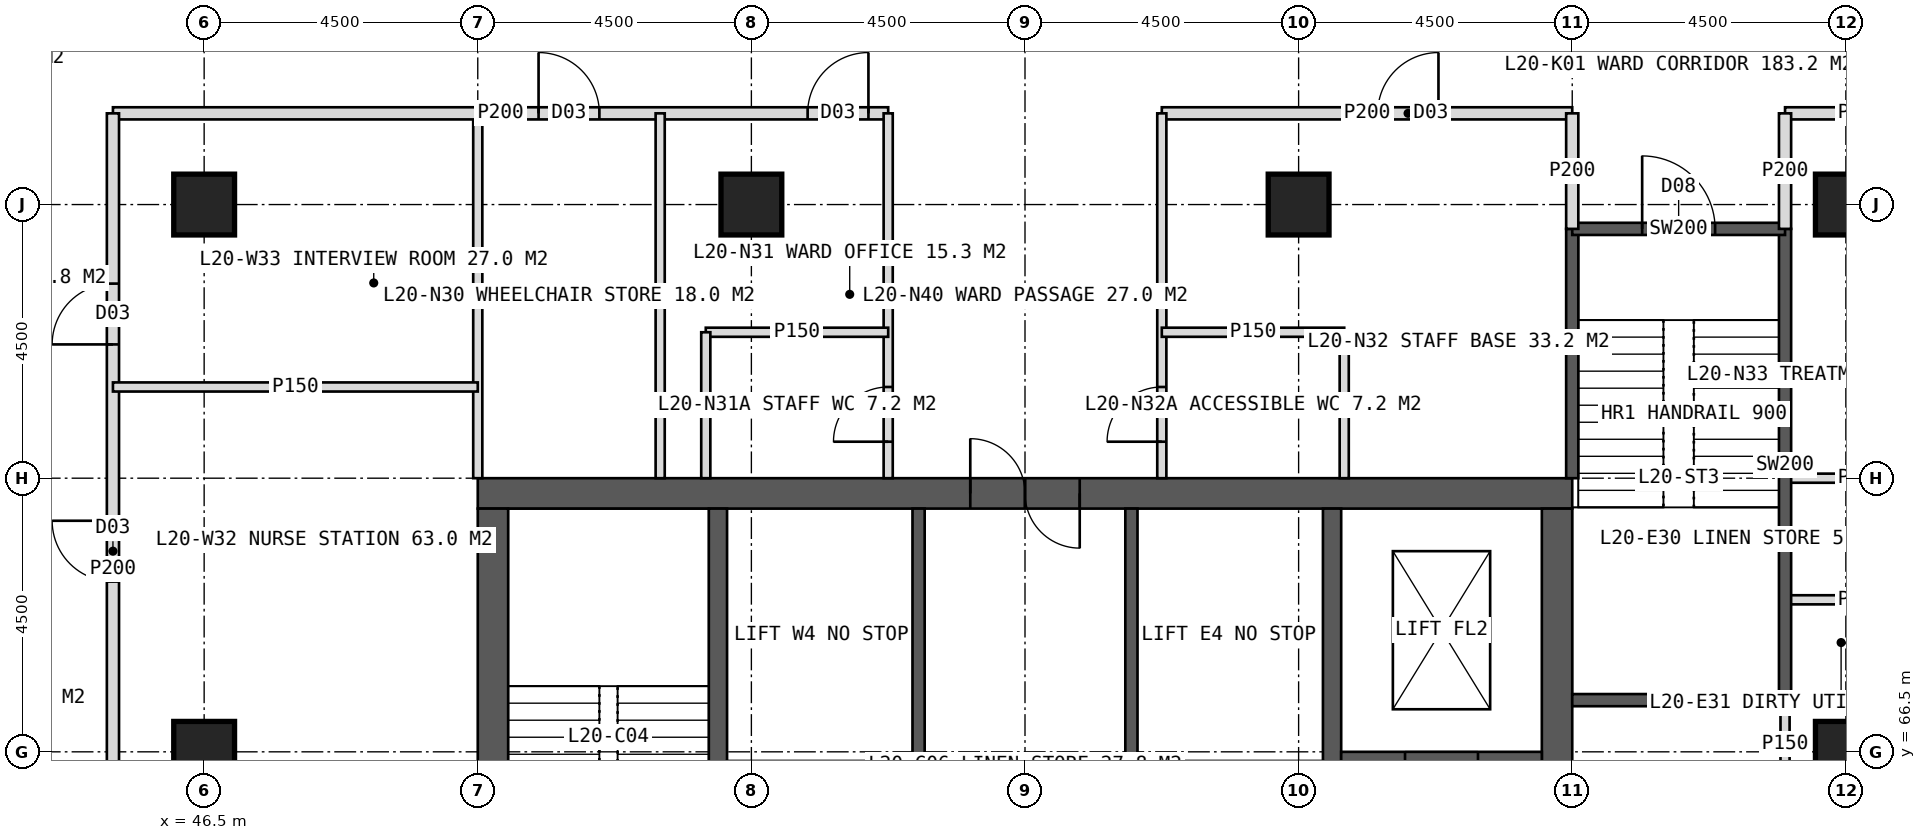
"""IFC4 building model, lengths in metres.
Left out: names, types, materials, properties, quantities, classifications, styles, units other than length and angle.
Written with IfcOpenShell. Run it as: python <this file> out.ifc"""

import sys

from ifc_helpers import new_model, si_unit, direction, frame, frame_2d, origin, origin_2d, place, context, subcontext, project, spatial, rectangle, hollow_rectangle, extrude, element, fill, save


model = new_model("IFC4")
c1 = context("Model", 3, precision=1e-05, world=origin(), true_north=direction((0.0, 1.0)))
c2 = subcontext(c1, "Body", "Model", "MODEL_VIEW")
j1 = project(units=[si_unit("LENGTHUNIT", "METRE"), si_unit("PLANEANGLEUNIT", "RADIAN")], contexts=[c1])
p1 = place(None, origin())
s1 = spatial("IfcSite", under=j1, at=p1, CompositionType="ELEMENT")
p2 = place(p1, origin())
s2 = spatial("IfcBuilding", under=s1, at=p2, CompositionType="ELEMENT")
p3 = place(p2, frame((0.0, 0.0, 87.0)))
s3 = spatial("IfcBuildingStorey", under=s2, at=p3, CompositionType="ELEMENT", Elevation=87.0)
p4 = place(p3, frame((51.0, 70.75, 0.0), z_axis=(0.0, 0.0, 1.0), x_axis=(1.0, 0.0, 0.0)))
e1 = element("IfcWall", 1, at=p4, inside=s3, PredefinedType="SHEAR", context=c2, shape_type="SweptSolid", body=[
    extrude(rectangle(XDim=18.0, YDim=0.5, at=frame_2d((9.0, 0.0))), origin(), (0.0, 0.0, 1.0), 4.0),
])
p5 = place(p4, frame((8.1, 0.0, 0.0)))
e2 = element("IfcOpeningElement", 2, at=p5, cuts=e1, PredefinedType="OPENING", context=c2, shape_type="SweptSolid", body=[
    extrude(rectangle(XDim=1.8, YDim=2.2, at=frame_2d((0.9, 1.1))), frame((0.0, 0.26, 0.0), z_axis=(0.0, -1.0, 0.0), x_axis=(1.0, 0.0, 0.0)), (0.0, 0.0, 1.0), 0.52),
])
p6 = place(p3, frame((51.25, 53.5, 0.0), z_axis=(0.0, 0.0, 1.0), x_axis=(0.0, 1.0, 0.0)))
e3 = element("IfcWall", 3, at=p6, inside=s3, PredefinedType="SHEAR", context=c2, shape_type="SweptSolid", body=[
    extrude(rectangle(XDim=17.0, YDim=0.5, at=frame_2d((8.5, 0.0))), origin(), (0.0, 0.0, 1.0), 4.0),
])
p7 = place(p6, frame((6.0, 0.0, 0.0)))
e4 = element("IfcOpeningElement", 4, at=p7, cuts=e3, PredefinedType="OPENING", context=c2, shape_type="SweptSolid", body=[
    extrude(rectangle(XDim=1.5, YDim=2.2, at=frame_2d((0.75, 1.1))), frame((0.0, 0.26, 0.0), z_axis=(0.0, -1.0, 0.0), x_axis=(1.0, 0.0, 0.0)), (0.0, 0.0, 1.0), 0.52),
])
p8 = place(p3, frame((68.75, 53.5, 0.0), z_axis=(0.0, 0.0, 1.0), x_axis=(0.0, 1.0, 0.0)))
e5 = element("IfcWall", 5, at=p8, inside=s3, PredefinedType="SHEAR", context=c2, shape_type="SweptSolid", body=[
    extrude(rectangle(XDim=17.0, YDim=0.5, at=frame_2d((8.5, 0.0))), origin(), (0.0, 0.0, 1.0), 4.0),
])
p9 = place(p8, frame((9.5, 0.0, 0.0)))
e6 = element("IfcOpeningElement", 6, at=p9, cuts=e5, PredefinedType="OPENING", context=c2, shape_type="SweptSolid", body=[
    extrude(rectangle(XDim=1.5, YDim=2.2, at=frame_2d((0.75, 1.1))), frame((0.0, 0.26, 0.0), z_axis=(0.0, -1.0, 0.0), x_axis=(1.0, 0.0, 0.0)), (0.0, 0.0, 1.0), 0.52),
])
for number, where, z_axis, x_axis in (
    (7, (54.95, 53.5, 0.0), (0.0, 0.0, 1.0), (0.0, 1.0, 0.0)),
    (8, (65.05, 53.5, 0.0), (0.0, 0.0, 1.0), (0.0, 1.0, 0.0)),
):
    element("IfcWall", number, at=place(p3, frame(where, z_axis=z_axis, x_axis=x_axis)), inside=s3, PredefinedType="SHEAR", context=c2, shape_type="SweptSolid", body=[
        extrude(rectangle(XDim=17.0, YDim=0.3, at=frame_2d((8.5, 0.0))), origin(), (0.0, 0.0, 1.0), 4.0),
    ])
p10 = place(p3, frame((58.25, 53.5, 0.0), z_axis=(0.0, 0.0, 1.0), x_axis=(0.0, 1.0, 0.0)))
e9 = element("IfcWall", 9, at=p10, inside=s3, PredefinedType="SHEAR", context=c2, shape_type="SweptSolid", body=[
    extrude(rectangle(XDim=17.0, YDim=0.2, at=frame_2d((8.5, 0.0))), origin(), (0.0, 0.0, 1.0), 4.0),
])
p11 = place(p10, frame((1.375, 0.0, 0.0)))
e10 = element("IfcOpeningElement", 10, at=p11, cuts=e9, PredefinedType="OPENING", context=c2, shape_type="SweptSolid", body=[
    extrude(rectangle(XDim=1.4, YDim=2.2, at=frame_2d((0.7, 1.1))), frame((0.0, 0.11, 0.0), z_axis=(0.0, -1.0, 0.0), x_axis=(1.0, 0.0, 0.0)), (0.0, 0.0, 1.0), 0.22),
])
p12 = place(p10, frame((5.675, 0.0, 0.0)))
e11 = element("IfcOpeningElement", 11, at=p12, cuts=e9, PredefinedType="OPENING", context=c2, shape_type="SweptSolid", body=[
    extrude(rectangle(XDim=1.4, YDim=2.2, at=frame_2d((0.7, 1.1))), frame((0.0, 0.11, 0.0), z_axis=(0.0, -1.0, 0.0), x_axis=(1.0, 0.0, 0.0)), (0.0, 0.0, 1.0), 0.22),
])
p13 = place(p3, frame((61.75, 53.5, 0.0), z_axis=(0.0, 0.0, 1.0), x_axis=(0.0, 1.0, 0.0)))
e12 = element("IfcWall", 12, at=p13, inside=s3, PredefinedType="SHEAR", context=c2, shape_type="SweptSolid", body=[
    extrude(rectangle(XDim=17.0, YDim=0.2, at=frame_2d((8.5, 0.0))), origin(), (0.0, 0.0, 1.0), 4.0),
])
p14 = place(p13, frame((1.375, 0.0, 0.0)))
e13 = element("IfcOpeningElement", 13, at=p14, cuts=e12, PredefinedType="OPENING", context=c2, shape_type="SweptSolid", body=[
    extrude(rectangle(XDim=1.4, YDim=2.2, at=frame_2d((0.7, 1.1))), frame((0.0, 0.11, 0.0), z_axis=(0.0, -1.0, 0.0), x_axis=(1.0, 0.0, 0.0)), (0.0, 0.0, 1.0), 0.22),
])
p15 = place(p13, frame((5.675, 0.0, 0.0)))
e14 = element("IfcOpeningElement", 14, at=p15, cuts=e12, PredefinedType="OPENING", context=c2, shape_type="SweptSolid", body=[
    extrude(rectangle(XDim=1.4, YDim=2.2, at=frame_2d((0.7, 1.1))), frame((0.0, 0.11, 0.0), z_axis=(0.0, -1.0, 0.0), x_axis=(1.0, 0.0, 0.0)), (0.0, 0.0, 1.0), 0.22),
])
p16 = place(p3, frame((65.2, 66.35, 0.0), z_axis=(0.0, 0.0, 1.0), x_axis=(1.0, 0.0, 0.0)))
e15 = element("IfcWall", 15, at=p16, inside=s3, PredefinedType="SHEAR", context=c2, shape_type="SweptSolid", body=[
    extrude(rectangle(XDim=3.3, YDim=0.3, at=frame_2d((1.65, 0.0))), origin(), (0.0, 0.0, 1.0), 4.0),
])
p17 = place(p16, frame((1.05, 0.0, 0.0)))
e16 = element("IfcOpeningElement", 16, at=p17, cuts=e15, PredefinedType="OPENING", context=c2, shape_type="SweptSolid", body=[
    extrude(rectangle(XDim=1.2, YDim=2.2, at=frame_2d((0.6, 1.1))), frame((0.0, 0.16, 0.0), z_axis=(0.0, -1.0, 0.0), x_axis=(1.0, 0.0, 0.0)), (0.0, 0.0, 1.0), 0.32),
])
for number, where, z_axis, x_axis in (
    (17, (73.5, 75.5, 0.0), (0.0, 0.0, 1.0), (1.0, 0.0, 0.0)),
    (18, (46.5, 75.5, 0.0), (0.0, 0.0, 1.0), (1.0, 0.0, 0.0)),
    (19, (55.5, 75.5, 0.0), (0.0, 0.0, 1.0), (1.0, 0.0, 0.0)),
    (20, (64.5, 75.5, 0.0), (0.0, 0.0, 1.0), (1.0, 0.0, 0.0)),
    (21, (46.5, 66.5, 0.0), (0.0, 0.0, 1.0), (1.0, 0.0, 0.0)),
    (22, (73.5, 66.5, 0.0), (0.0, 0.0, 1.0), (1.0, 0.0, 0.0)),
):
    element("IfcColumn", number, at=place(p3, frame(where, z_axis=z_axis, x_axis=x_axis)), inside=s3, PredefinedType="COLUMN", context=c2, shape_type="SweptSolid", body=[
        extrude(hollow_rectangle(XDim=1.0, YDim=1.0, WallThickness=0.1, at=origin_2d()), origin(), (0.0, 0.0, 1.0), 4.0),
    ])
p18 = place(p3, frame((51.0, 71.0, 0.0), z_axis=(0.0, 0.0, 1.0), x_axis=(0.0, 1.0, 0.0)))
e23 = element("IfcWall", 23, at=p18, inside=s3, PredefinedType="PARTITIONING", context=c2, shape_type="SweptSolid", body=[
    extrude(rectangle(XDim=6.0, YDim=0.15, at=frame_2d((3.0, 0.0))), origin(), (0.0, 0.0, 1.0), 3.75),
])
p19 = place(p3, frame((45.0, 77.0, 0.0), z_axis=(0.0, 0.0, 1.0), x_axis=(1.0, 0.0, 0.0)))
e24 = element("IfcWall", 24, at=p19, inside=s3, PredefinedType="PARTITIONING", context=c2, shape_type="SweptSolid", body=[
    extrude(rectangle(XDim=12.75, YDim=0.2, at=frame_2d((6.375, 0.0))), origin(), (0.0, 0.0, 1.0), 3.75),
])
p20 = place(p19, frame((7.0, 0.0, 0.0)))
e25 = element("IfcOpeningElement", 25, at=p20, cuts=e24, PredefinedType="OPENING", context=c2, shape_type="SweptSolid", body=[
    extrude(rectangle(XDim=1.0, YDim=2.1, at=frame_2d((0.5, 1.05))), frame((0.0, 0.11, 0.0), z_axis=(0.0, -1.0, 0.0), x_axis=(1.0, 0.0, 0.0)), (0.0, 0.0, 1.0), 0.22),
])
p21 = place(p19, frame((11.425, 0.0, 0.0)))
e26 = element("IfcOpeningElement", 26, at=p21, cuts=e24, PredefinedType="OPENING", context=c2, shape_type="SweptSolid", body=[
    extrude(rectangle(XDim=1.0, YDim=2.1, at=frame_2d((0.5, 1.05))), frame((0.0, 0.11, 0.0), z_axis=(0.0, -1.0, 0.0), x_axis=(1.0, 0.0, 0.0)), (0.0, 0.0, 1.0), 0.22),
])
p22 = place(p3, frame((62.25, 77.0, 0.0), z_axis=(0.0, 0.0, 1.0), x_axis=(1.0, 0.0, 0.0)))
e27 = element("IfcWall", 27, at=p22, inside=s3, PredefinedType="PARTITIONING", context=c2, shape_type="SweptSolid", body=[
    extrude(rectangle(XDim=6.75, YDim=0.2, at=frame_2d((3.375, 0.0))), origin(), (0.0, 0.0, 1.0), 3.75),
])
p23 = place(p22, frame((3.55, 0.0, 0.0)))
e28 = element("IfcOpeningElement", 28, at=p23, cuts=e27, PredefinedType="OPENING", context=c2, shape_type="SweptSolid", body=[
    extrude(rectangle(XDim=1.0, YDim=2.1, at=frame_2d((0.5, 1.05))), frame((0.0, 0.11, 0.0), z_axis=(0.0, -1.0, 0.0), x_axis=(1.0, 0.0, 0.0)), (0.0, 0.0, 1.0), 0.22),
])
p24 = place(p3, frame((72.5, 77.0, 0.0), z_axis=(0.0, 0.0, 1.0), x_axis=(1.0, 0.0, 0.0)))
e29 = element("IfcWall", 29, at=p24, inside=s3, PredefinedType="PARTITIONING", context=c2, shape_type="SweptSolid", body=[
    extrude(rectangle(XDim=2.5, YDim=0.2, at=frame_2d((1.25, 0.0))), origin(), (0.0, 0.0, 1.0), 3.75),
])
p25 = place(p3, frame((57.75, 71.0, 0.0), z_axis=(0.0, 0.0, 1.0), x_axis=(0.0, 1.0, 0.0)))
e30 = element("IfcWall", 30, at=p25, inside=s3, PredefinedType="PARTITIONING", context=c2, shape_type="SweptSolid", body=[
    extrude(rectangle(XDim=6.0, YDim=0.15, at=frame_2d((3.0, 0.0))), origin(), (0.0, 0.0, 1.0), 3.75),
])
p26 = place(p25, frame((0.6, 0.0, 0.0)))
e31 = element("IfcOpeningElement", 31, at=p26, cuts=e30, PredefinedType="OPENING", context=c2, shape_type="SweptSolid", body=[
    extrude(rectangle(XDim=0.9, YDim=2.1, at=frame_2d((0.45, 1.05))), frame((0.0, 0.085, 0.0), z_axis=(0.0, -1.0, 0.0), x_axis=(1.0, 0.0, 0.0)), (0.0, 0.0, 1.0), 0.17),
])
p27 = place(p3, frame((62.25, 71.0, 0.0), z_axis=(0.0, 0.0, 1.0), x_axis=(0.0, 1.0, 0.0)))
e32 = element("IfcWall", 32, at=p27, inside=s3, PredefinedType="PARTITIONING", context=c2, shape_type="SweptSolid", body=[
    extrude(rectangle(XDim=6.0, YDim=0.15, at=frame_2d((3.0, 0.0))), origin(), (0.0, 0.0, 1.0), 3.75),
])
p28 = place(p27, frame((0.6, 0.0, 0.0)))
e33 = element("IfcOpeningElement", 33, at=p28, cuts=e32, PredefinedType="OPENING", context=c2, shape_type="SweptSolid", body=[
    extrude(rectangle(XDim=0.9, YDim=2.1, at=frame_2d((0.45, 1.05))), frame((0.0, 0.085, 0.0), z_axis=(0.0, -1.0, 0.0), x_axis=(1.0, 0.0, 0.0)), (0.0, 0.0, 1.0), 0.17),
])
p29 = place(p3, frame((54.0, 71.0, 0.0), z_axis=(0.0, 0.0, 1.0), x_axis=(0.0, 1.0, 0.0)))
e34 = element("IfcWall", 34, at=p29, inside=s3, PredefinedType="PARTITIONING", context=c2, shape_type="SweptSolid", body=[
    extrude(rectangle(XDim=6.0, YDim=0.15, at=frame_2d((3.0, 0.0))), origin(), (0.0, 0.0, 1.0), 3.75),
])
p30 = place(p3, frame((54.75, 73.4, 0.0), z_axis=(0.0, 0.0, 1.0), x_axis=(1.0, 0.0, 0.0)))
e35 = element("IfcWall", 35, at=p30, inside=s3, PredefinedType="PARTITIONING", context=c2, shape_type="SweptSolid", body=[
    extrude(rectangle(XDim=3.0, YDim=0.15, at=frame_2d((1.5, 0.0))), origin(), (0.0, 0.0, 1.0), 3.75),
])
p31 = place(p3, frame((54.75, 71.0, 0.0), z_axis=(0.0, 0.0, 1.0), x_axis=(0.0, 1.0, 0.0)))
e36 = element("IfcWall", 36, at=p31, inside=s3, PredefinedType="PARTITIONING", context=c2, shape_type="SweptSolid", body=[
    extrude(rectangle(XDim=2.4, YDim=0.15, at=frame_2d((1.2, 0.0))), origin(), (0.0, 0.0, 1.0), 3.75),
])
p32 = place(p3, frame((62.25, 73.4, 0.0), z_axis=(0.0, 0.0, 1.0), x_axis=(1.0, 0.0, 0.0)))
e37 = element("IfcWall", 37, at=p32, inside=s3, PredefinedType="PARTITIONING", context=c2, shape_type="SweptSolid", body=[
    extrude(rectangle(XDim=3.0, YDim=0.15, at=frame_2d((1.5, 0.0))), origin(), (0.0, 0.0, 1.0), 3.75),
])
p33 = place(p3, frame((65.25, 71.0, 0.0), z_axis=(0.0, 0.0, 1.0), x_axis=(0.0, 1.0, 0.0)))
e38 = element("IfcWall", 38, at=p33, inside=s3, PredefinedType="PARTITIONING", context=c2, shape_type="SweptSolid", body=[
    extrude(rectangle(XDim=2.4, YDim=0.15, at=frame_2d((1.2, 0.0))), origin(), (0.0, 0.0, 1.0), 3.75),
])
p34 = place(p3, frame((45.0, 62.0, 0.0), z_axis=(0.0, 0.0, 1.0), x_axis=(0.0, 1.0, 0.0)))
e39 = element("IfcWall", 39, at=p34, inside=s3, PredefinedType="PARTITIONING", context=c2, shape_type="SweptSolid", body=[
    extrude(rectangle(XDim=15.0, YDim=0.2, at=frame_2d((7.5, 0.0))), origin(), (0.0, 0.0, 1.0), 3.75),
])
p35 = place(p34, frame((7.3, 0.0, 0.0)))
e40 = element("IfcOpeningElement", 40, at=p35, cuts=e39, PredefinedType="OPENING", context=c2, shape_type="SweptSolid", body=[
    extrude(rectangle(XDim=1.0, YDim=2.1, at=frame_2d((0.5, 1.05))), frame((0.0, 0.11, 0.0), z_axis=(0.0, -1.0, 0.0), x_axis=(1.0, 0.0, 0.0)), (0.0, 0.0, 1.0), 0.22),
])
p36 = place(p34, frame((11.2, 0.0, 0.0)))
e41 = element("IfcOpeningElement", 41, at=p36, cuts=e39, PredefinedType="OPENING", context=c2, shape_type="SweptSolid", body=[
    extrude(rectangle(XDim=1.0, YDim=2.1, at=frame_2d((0.5, 1.05))), frame((0.0, 0.11, 0.0), z_axis=(0.0, -1.0, 0.0), x_axis=(1.0, 0.0, 0.0)), (0.0, 0.0, 1.0), 0.22),
])
p37 = place(p3, frame((51.0, 72.5, 0.0), z_axis=(0.0, 0.0, 1.0), x_axis=(-1.0, 0.0, 0.0)))
e42 = element("IfcWall", 42, at=p37, inside=s3, PredefinedType="PARTITIONING", context=c2, shape_type="SweptSolid", body=[
    extrude(rectangle(XDim=6.0, YDim=0.15, at=frame_2d((3.0, 0.0))), origin(), (0.0, 0.0, 1.0), 3.75),
])
for number, where, z_axis, x_axis in (
    (43, (72.5, 71.0, 0.0), (0.0, 0.0, 1.0), (1.0, 0.0, 0.0)),
    (44, (72.5, 69.0, 0.0), (0.0, 0.0, 1.0), (1.0, 0.0, 0.0)),
):
    element("IfcWall", number, at=place(p3, frame(where, z_axis=z_axis, x_axis=x_axis)), inside=s3, PredefinedType="PARTITIONING", context=c2, shape_type="SweptSolid", body=[
        extrude(rectangle(XDim=2.5, YDim=0.15, at=frame_2d((1.25, 0.0))), origin(), (0.0, 0.0, 1.0), 3.75),
    ])
p38 = place(p3, frame((72.5, 65.9, 0.0), z_axis=(0.0, 0.0, 1.0), x_axis=(0.0, 1.0, 0.0)))
e45 = element("IfcWall", 45, at=p38, inside=s3, PredefinedType="PARTITIONING", context=c2, shape_type="SweptSolid", body=[
    extrude(rectangle(XDim=1.45, YDim=0.15, at=frame_2d((0.725, 0.0))), origin(), (0.0, 0.0, 1.0), 3.75),
])
p39 = place(p3, frame((69.0, 71.0, 0.0), z_axis=(0.0, 0.0, 1.0), x_axis=(0.0, 1.0, 0.0)))
e46 = element("IfcWall", 46, at=p39, inside=s3, PredefinedType="SOLIDWALL", context=c2, shape_type="SweptSolid", body=[
    extrude(rectangle(XDim=4.1, YDim=0.2, at=frame_2d((2.05, 0.0))), origin(), (0.0, 0.0, 1.0), 3.75),
])
p40 = place(p3, frame((69.0, 67.35, 0.0), z_axis=(0.0, 0.0, 1.0), x_axis=(1.0, 0.0, 0.0)))
e47 = element("IfcWall", 47, at=p40, inside=s3, PredefinedType="SOLIDWALL", context=c2, shape_type="SweptSolid", body=[
    extrude(rectangle(XDim=3.5, YDim=0.2, at=frame_2d((1.75, 0.0))), origin(), (0.0, 0.0, 1.0), 3.75),
])
p41 = place(p3, frame((72.5, 67.35, 0.0), z_axis=(0.0, 0.0, 1.0), x_axis=(0.0, 1.0, 0.0)))
e48 = element("IfcWall", 48, at=p41, inside=s3, PredefinedType="SOLIDWALL", context=c2, shape_type="SweptSolid", body=[
    extrude(rectangle(XDim=7.75, YDim=0.2, at=frame_2d((3.875, 0.0))), origin(), (0.0, 0.0, 1.0), 3.75),
])
p42 = place(p3, frame((69.0, 75.1, 0.0), z_axis=(0.0, 0.0, 1.0), x_axis=(1.0, 0.0, 0.0)))
e49 = element("IfcWall", 49, at=p42, inside=s3, PredefinedType="SOLIDWALL", context=c2, shape_type="SweptSolid", body=[
    extrude(rectangle(XDim=3.5, YDim=0.2, at=frame_2d((1.75, 0.0))), origin(), (0.0, 0.0, 1.0), 3.75),
])
p43 = place(p42, frame((1.15, 0.0, 0.0)))
e50 = element("IfcOpeningElement", 50, at=p43, cuts=e49, PredefinedType="OPENING", context=c2, shape_type="SweptSolid", body=[
    extrude(rectangle(XDim=1.2, YDim=2.1, at=frame_2d((0.6, 1.05))), frame((0.0, 0.11, 0.0), z_axis=(0.0, -1.0, 0.0), x_axis=(1.0, 0.0, 0.0)), (0.0, 0.0, 1.0), 0.22),
])
for number, where, z_axis, x_axis in (
    (51, (69.0, 75.1, 0.0), (0.0, 0.0, 1.0), (0.0, 1.0, 0.0)),
    (52, (72.5, 75.1, 0.0), (0.0, 0.0, 1.0), (0.0, 1.0, 0.0)),
):
    element("IfcWall", number, at=place(p3, frame(where, z_axis=z_axis, x_axis=x_axis)), inside=s3, PredefinedType="PARTITIONING", context=c2, shape_type="SweptSolid", body=[
        extrude(rectangle(XDim=1.9, YDim=0.2, at=frame_2d((0.95, 0.0))), origin(), (0.0, 0.0, 1.0), 3.75),
    ])
p44 = place(p20, origin())
e53 = element("IfcDoor", 53, at=p44, inside=s3, OperationType="SINGLE_SWING_LEFT", PredefinedType="DOOR", context=c2, shape_type="SweptSolid", body=[
    extrude(rectangle(XDim=1.0, YDim=2.1, at=frame_2d((0.5, 1.05))), frame((0.0, 0.025, 0.0), z_axis=(0.0, -1.0, 0.0), x_axis=(1.0, 0.0, 0.0)), (0.0, 0.0, 1.0), 0.05),
])
fill(e25, e53)
p45 = place(p26, origin())
e54 = element("IfcDoor", 54, at=p45, inside=s3, OperationType="SINGLE_SWING_LEFT", PredefinedType="DOOR", context=c2, shape_type="SweptSolid", body=[
    extrude(rectangle(XDim=0.9, YDim=2.1, at=frame_2d((0.45, 1.05))), frame((0.0, 0.025, 0.0), z_axis=(0.0, -1.0, 0.0), x_axis=(1.0, 0.0, 0.0)), (0.0, 0.0, 1.0), 0.05),
])
fill(e31, e54)
p46 = place(p21, origin())
e55 = element("IfcDoor", 55, at=p46, inside=s3, OperationType="SINGLE_SWING_RIGHT", PredefinedType="DOOR", context=c2, shape_type="SweptSolid", body=[
    extrude(rectangle(XDim=1.0, YDim=2.1, at=frame_2d((0.5, 1.05))), frame((0.0, 0.025, 0.0), z_axis=(0.0, -1.0, 0.0), x_axis=(1.0, 0.0, 0.0)), (0.0, 0.0, 1.0), 0.05),
])
fill(e26, e55)
p47 = place(p28, origin())
e56 = element("IfcDoor", 56, at=p47, inside=s3, OperationType="SINGLE_SWING_LEFT", PredefinedType="DOOR", context=c2, shape_type="SweptSolid", body=[
    extrude(rectangle(XDim=0.9, YDim=2.1, at=frame_2d((0.45, 1.05))), frame((0.0, 0.025, 0.0), z_axis=(0.0, -1.0, 0.0), x_axis=(1.0, 0.0, 0.0)), (0.0, 0.0, 1.0), 0.05),
])
fill(e33, e56)
p48 = place(p23, origin())
e57 = element("IfcDoor", 57, at=p48, inside=s3, OperationType="SINGLE_SWING_RIGHT", PredefinedType="DOOR", context=c2, shape_type="SweptSolid", body=[
    extrude(rectangle(XDim=1.0, YDim=2.1, at=frame_2d((0.5, 1.05))), frame((0.0, 0.025, 0.0), z_axis=(0.0, -1.0, 0.0), x_axis=(1.0, 0.0, 0.0)), (0.0, 0.0, 1.0), 0.05),
])
fill(e28, e57)
p49 = place(p35, origin())
e58 = element("IfcDoor", 58, at=p49, inside=s3, OperationType="SINGLE_SWING_RIGHT", PredefinedType="DOOR", context=c2, shape_type="SweptSolid", body=[
    extrude(rectangle(XDim=1.0, YDim=2.1, at=frame_2d((0.5, 1.05))), frame((0.0, 0.025, 0.0), z_axis=(0.0, -1.0, 0.0), x_axis=(1.0, 0.0, 0.0)), (0.0, 0.0, 1.0), 0.05),
])
fill(e40, e58)
p50 = place(p36, origin())
e59 = element("IfcDoor", 59, at=p50, inside=s3, OperationType="SINGLE_SWING_LEFT", PredefinedType="DOOR", context=c2, shape_type="SweptSolid", body=[
    extrude(rectangle(XDim=1.0, YDim=2.1, at=frame_2d((0.5, 1.05))), frame((0.0, 0.025, 0.0), z_axis=(0.0, -1.0, 0.0), x_axis=(1.0, 0.0, 0.0)), (0.0, 0.0, 1.0), 0.05),
])
fill(e41, e59)
p51 = place(p17, origin())
e60 = element("IfcDoor", 60, at=p51, inside=s3, OperationType="SLIDING_TO_LEFT", PredefinedType="DOOR", context=c2, shape_type="SweptSolid", body=[
    extrude(rectangle(XDim=1.2, YDim=2.2, at=frame_2d((0.6, 1.1))), frame((0.0, 0.025, 0.0), z_axis=(0.0, -1.0, 0.0), x_axis=(1.0, 0.0, 0.0)), (0.0, 0.0, 1.0), 0.05),
])
fill(e16, e60)
p52 = place(p5, origin())
e61 = element("IfcDoor", 61, at=p52, inside=s3, OperationType="DOUBLE_DOOR_SINGLE_SWING", PredefinedType="DOOR", context=c2, shape_type="SweptSolid", body=[
    extrude(rectangle(XDim=1.8, YDim=2.2, at=frame_2d((0.9, 1.1))), frame((0.0, 0.025, 0.0), z_axis=(0.0, -1.0, 0.0), x_axis=(1.0, 0.0, 0.0)), (0.0, 0.0, 1.0), 0.05),
])
fill(e2, e61)
p53 = place(p43, origin())
e62 = element("IfcDoor", 62, at=p53, inside=s3, OperationType="SINGLE_SWING_LEFT", PredefinedType="DOOR", context=c2, shape_type="SweptSolid", body=[
    extrude(rectangle(XDim=1.2, YDim=2.1, at=frame_2d((0.6, 1.05))), frame((0.0, 0.025, 0.0), z_axis=(0.0, -1.0, 0.0), x_axis=(1.0, 0.0, 0.0)), (0.0, 0.0, 1.0), 0.05),
])
fill(e50, e62)
save(model, sys.argv[1])
